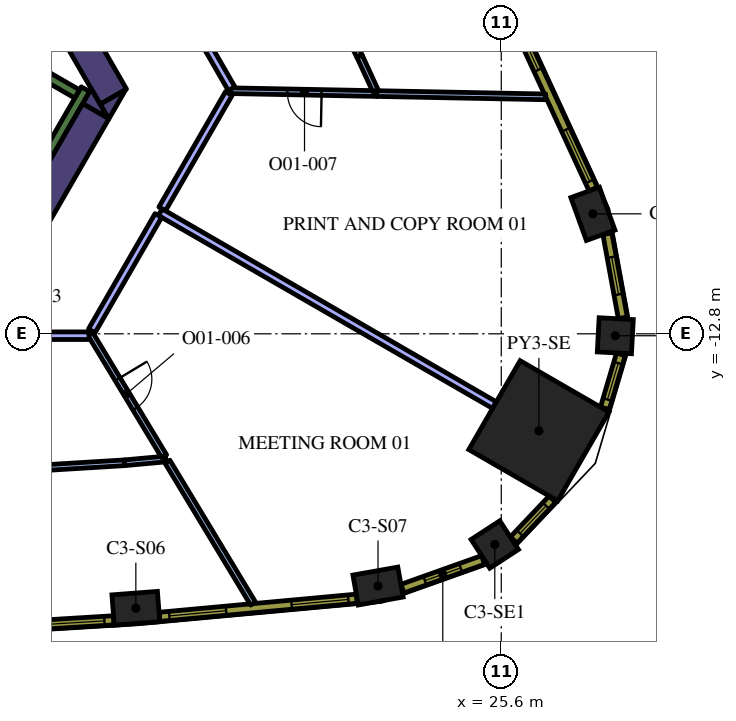
"""IFC4 building model, lengths in metres.
Left out: names, types, materials, properties, quantities, classifications, styles, units other than length and angle.
Written with IfcOpenShell. Run it as: python <this file> out.ifc"""

import sys

from ifc_helpers import new_model, si_unit, direction, frame, frame_2d, origin, origin_2d, place, context, subcontext, project, spatial, polyline, rectangle, outline, extrude, element, fill, save


model = new_model("IFC4")
c1 = context("Model", 3, precision=1e-05, world=origin(), true_north=direction((0.0, 1.0)))
c2 = subcontext(c1, "Body", "Model", "MODEL_VIEW")
j1 = project(units=[si_unit("LENGTHUNIT", "METRE"), si_unit("PLANEANGLEUNIT", "RADIAN")], contexts=[c1])
p1 = place(None, origin())
s1 = spatial("IfcSite", under=j1, at=p1, CompositionType="ELEMENT")
p2 = place(p1, origin())
s2 = spatial("IfcBuilding", under=s1, at=p2, CompositionType="ELEMENT")
p3 = place(p2, frame((0.0, 0.0, 145.8)))
s3 = spatial("IfcBuildingStorey", under=s2, at=p3, CompositionType="ELEMENT", Elevation=145.8)
p4 = place(p3, frame((26.591, -15.352, 0.0), z_axis=(0.0, 0.0, 1.0), x_axis=(0.866025403784, -0.5, 0.0)))
e1 = element("IfcColumn", 1, at=p4, inside=s3, PredefinedType="COLUMN", context=c2, shape_type="SweptSolid", body=[
    extrude(rectangle(XDim=2.7, YDim=2.7, at=origin_2d()), origin(), (0.0, 0.0, 1.0), 4.2),
])
for number, where, z_axis, x_axis in (
    (2, (15.985, -20.022, 0.0), (0.0, 0.0, 1.0), (0.997, 0.076, 0.0)),
    (3, (22.357, -19.437, 0.0), (0.0, 0.0, 1.0), (0.985, 0.175, 0.0)),
):
    element("IfcColumn", number, at=place(p3, frame(where, z_axis=z_axis, x_axis=x_axis)), inside=s3, PredefinedType="COLUMN", context=c2, shape_type="SweptSolid", body=[
        extrude(rectangle(XDim=1.2, YDim=0.8, at=origin_2d()), origin(), (0.0, 0.0, 1.0), 4.2),
    ])
for number, where, z_axis, x_axis in (
    (4, (25.43, -18.344, 0.0), (0.0, 0.0, 1.0), (0.838, 0.546, 0.0)),
    (5, (28.601, -12.851, 0.0), (0.0, 0.0, 1.0), (0.053, 0.999, 0.0)),
):
    element("IfcColumn", number, at=place(p3, frame(where, z_axis=z_axis, x_axis=x_axis)), inside=s3, PredefinedType="COLUMN", context=c2, shape_type="SweptSolid", body=[
        extrude(rectangle(XDim=0.9, YDim=0.9, at=origin_2d()), origin(), (0.0, 0.0, 1.0), 4.2),
    ])
p5 = place(p3, frame((28.012, -9.644, 0.0), z_axis=(0.0, 0.0, 1.0), x_axis=(-0.340743851601, 0.940156171918, 0.0)))
e6 = element("IfcColumn", 6, at=p5, inside=s3, PredefinedType="COLUMN", context=c2, shape_type="SweptSolid", body=[
    extrude(rectangle(XDim=1.2, YDim=0.8, at=origin_2d()), origin(), (0.0, 0.0, 1.0), 4.2),
])
p6 = place(p3, frame((9.129, 4.289, 0.0), z_axis=(0.0, 0.0, 1.0), x_axis=(0.499995742806, -0.866027861663, 0.0)))
e7 = element("IfcWall", 7, at=p6, inside=s3, PredefinedType="SOLIDWALL", context=c2, shape_type="SweptSolid", body=[
    extrude(rectangle(XDim=12.527, YDim=0.8, at=frame_2d((6.264, 0.0))), origin(), (0.0, 0.0, 1.0), 4.2),
])
p7 = place(p3, origin())
e8 = element("IfcWall", 8, at=p7, inside=s3, PredefinedType="SOLIDWALL", context=c2, shape_type="SweptSolid", body=[
    extrude(outline(polyline([(15.271, -7.15), (15.047, -6.762), (15.719, -6.374), (15.271, -7.15)])), origin(), (0.0, 0.0, 1.0), 4.2),
])
p8 = place(p3, frame((13.018, -10.252, 0.0), z_axis=(0.0, 0.0, 1.0), x_axis=(0.499984020225, 0.866034629516, 0.0)))
e9 = element("IfcWall", 9, at=p8, inside=s3, PredefinedType="SOLIDWALL", context=c2, shape_type="SweptSolid", body=[
    extrude(rectangle(XDim=3.824, YDim=0.8, at=frame_2d((1.912, 0.0))), origin(), (0.0, 0.0, 1.0), 4.2),
])
e10 = element("IfcWall", 10, at=p7, inside=s3, PredefinedType="SOLIDWALL", context=c2, shape_type="SweptSolid", body=[
    extrude(outline(polyline([(14.809, -6.35), (15.257, -7.126), (14.585, -6.738), (14.809, -6.35)])), origin(), (0.0, 0.0, 1.0), 4.2),
])
p9 = place(p3, frame((12.84, -9.511, 0.0), z_axis=(0.0, 0.0, 1.0), x_axis=(0.499997733992, 0.866026712061, 0.0)))
e11 = element("IfcWall", 11, at=p9, inside=s3, PredefinedType="SOLIDWALL", context=c2, shape_type="SweptSolid", body=[
    extrude(rectangle(XDim=3.634, YDim=0.25, at=frame_2d((1.817, 0.0))), origin(), (0.0, 0.0, 1.0), 4.2),
])
p10 = place(p3, frame((8.334, -2.964, 0.0), z_axis=(0.0, 0.0, 1.0), x_axis=(0.866016039709, -0.500016218704, 0.0)))
e12 = element("IfcWall", 12, at=p10, inside=s3, PredefinedType="SOLIDWALL", context=c2, shape_type="SweptSolid", body=[
    extrude(rectangle(XDim=7.05, YDim=0.25, at=frame_2d((3.525, 0.0))), origin(), (0.0, 0.0, 1.0), 4.2),
])
p11 = place(p3, frame((15.692, -16.193, 0.0), z_axis=(0.0, 0.0, 1.0), x_axis=(-0.998137075468, -0.061011298754, 0.0)))
e13 = element("IfcWall", 13, at=p11, inside=s3, PredefinedType="PARTITIONING", context=c2, shape_type="SweptSolid", body=[
    extrude(rectangle(XDim=6.282, YDim=0.15, at=frame_2d((3.141, 0.0))), origin(), (0.0, 0.0, 1.0), 3.15),
])
p12 = place(p11, frame((2.683, 0.0, 0.0)))
e14 = element("IfcOpeningElement", 14, at=p12, cuts=e13, PredefinedType="OPENING", context=c2, shape_type="SweptSolid", body=[
    extrude(rectangle(XDim=0.9, YDim=2.1, at=frame_2d((0.45, 1.05))), frame((0.0, 0.085, 0.0), z_axis=(0.0, -1.0, 0.0), x_axis=(1.0, 0.0, 0.0)), (0.0, 0.0, 1.0), 0.17),
])
p13 = place(p3, frame((15.692, -16.193, 0.0), z_axis=(0.0, 0.0, 1.0), x_axis=(0.995822859979, 0.091306251389, 0.0)))
e15 = element("IfcWall", 15, at=p13, inside=s3, PredefinedType="PARTITIONING", context=c2, shape_type="SweptSolid", body=[
    extrude(rectangle(XDim=1.086, YDim=0.15, at=frame_2d((0.543, 0.0))), origin(), (0.0, 0.0, 1.0), 3.15),
])
p14 = place(p3, frame((16.816, -16.165, 0.0), z_axis=(0.0, 0.0, 1.0), x_axis=(0.516814925326, -0.85609715159, 0.0)))
e16 = element("IfcWall", 16, at=p14, inside=s3, PredefinedType="PARTITIONING", context=c2, shape_type="SweptSolid", body=[
    extrude(rectangle(XDim=4.362, YDim=0.15, at=frame_2d((2.181, 0.0))), origin(), (0.0, 0.0, 1.0), 3.15),
])
p15 = place(p3, frame((14.782, -12.796, 0.0), z_axis=(0.0, 0.0, 1.0), x_axis=(0.516809076879, -0.856100682196, 0.0)))
e17 = element("IfcWall", 17, at=p15, inside=s3, PredefinedType="PARTITIONING", context=c2, shape_type="SweptSolid", body=[
    extrude(rectangle(XDim=3.768, YDim=0.15, at=frame_2d((1.884, 0.0))), origin(), (0.0, 0.0, 1.0), 3.15),
])
p16 = place(p15, frame((1.4, 0.0, 0.0)))
e18 = element("IfcOpeningElement", 18, at=p16, cuts=e17, PredefinedType="OPENING", context=c2, shape_type="SweptSolid", body=[
    extrude(rectangle(XDim=0.9, YDim=2.1, at=frame_2d((0.45, 1.05))), frame((0.0, 0.085, 0.0), z_axis=(0.0, -1.0, 0.0), x_axis=(1.0, 0.0, 0.0)), (0.0, 0.0, 1.0), 0.17),
])
p17 = place(p3, frame((5.03, -12.85, 0.0), z_axis=(0.0, 0.0, 1.0), x_axis=(1.0, 0.0, 0.0)))
e19 = element("IfcWall", 19, at=p17, inside=s3, PredefinedType="PARTITIONING", context=c2, shape_type="SweptSolid", body=[
    extrude(rectangle(XDim=9.721, YDim=0.2, at=frame_2d((4.861, 0.0))), origin(), (0.0, 0.0, 1.0), 3.15),
])
p18 = place(p3, frame((16.628, -9.6, 0.0), z_axis=(0.0, 0.0, 1.0), x_axis=(0.866031435434, -0.499989552732, 0.0)))
e20 = element("IfcWall", 20, at=p18, inside=s3, PredefinedType="PARTITIONING", context=c2, shape_type="SweptSolid", body=[
    extrude(rectangle(XDim=10.154, YDim=0.2, at=frame_2d((5.077, 0.0))), origin(), (0.0, 0.0, 1.0), 3.15),
])
p19 = place(p3, frame((14.825, -12.722, 0.0), z_axis=(0.0, 0.0, 1.0), x_axis=(0.499981686864, 0.86603597662, 0.0)))
e21 = element("IfcWall", 21, at=p19, inside=s3, PredefinedType="PARTITIONING", context=c2, shape_type="SweptSolid", body=[
    extrude(rectangle(XDim=3.506, YDim=0.2, at=frame_2d((1.753, 0.0))), origin(), (0.0, 0.0, 1.0), 3.15),
])
p20 = place(p3, frame((22.32, -6.479, 0.0), z_axis=(0.0, 0.0, 1.0), x_axis=(0.999809252738, -0.019530953357, 0.0)))
e22 = element("IfcWall", 22, at=p20, inside=s3, PredefinedType="PARTITIONING", context=c2, shape_type="SweptSolid", body=[
    extrude(rectangle(XDim=4.45, YDim=0.15, at=frame_2d((2.225, 0.0))), origin(), (0.0, 0.0, 1.0), 3.15),
])
p21 = place(p3, frame((22.328, -6.479, 0.0), z_axis=(0.0, 0.0, 1.0), x_axis=(-0.999809811932, 0.019502306655, 0.0)))
e23 = element("IfcWall", 23, at=p21, inside=s3, PredefinedType="PARTITIONING", context=c2, shape_type="SweptSolid", body=[
    extrude(rectangle(XDim=3.856, YDim=0.15, at=frame_2d((1.928, 0.0))), origin(), (0.0, 0.0, 1.0), 3.15),
])
p22 = place(p21, frame((1.456, 0.0, 0.0)))
e24 = element("IfcOpeningElement", 24, at=p22, cuts=e23, PredefinedType="OPENING", context=c2, shape_type="SweptSolid", body=[
    extrude(rectangle(XDim=0.9, YDim=2.1, at=frame_2d((0.45, 1.05))), frame((0.0, 0.085, 0.0), z_axis=(0.0, -1.0, 0.0), x_axis=(1.0, 0.0, 0.0)), (0.0, 0.0, 1.0), 0.17),
])
p23 = place(p3, frame((16.678, -9.513, 0.0), z_axis=(0.0, 0.0, 1.0), x_axis=(0.500011844827, 0.866018565062, 0.0)))
e25 = element("IfcWall", 25, at=p23, inside=s3, PredefinedType="PARTITIONING", context=c2, shape_type="SweptSolid", body=[
    extrude(rectangle(XDim=3.505, YDim=0.2, at=frame_2d((1.753, 0.0))), origin(), (0.0, 0.0, 1.0), 3.15),
])
p24 = place(p3, frame((22.289, -6.403, 0.0), z_axis=(0.0, 0.0, 1.0), x_axis=(-0.41893460807, 0.908016406328, 0.0)))
e26 = element("IfcWall", 26, at=p24, inside=s3, PredefinedType="PARTITIONING", context=c2, shape_type="SweptSolid", body=[
    extrude(rectangle(XDim=1.002, YDim=0.15, at=frame_2d((0.501, 0.0))), origin(), (0.0, 0.0, 1.0), 3.15),
])
p25 = place(p3, frame((19.066, 0.129, 0.0), z_axis=(0.0, 0.0, 1.0), x_axis=(0.446202922071, -0.89493181435, 0.0)))
e27 = element("IfcWall", 27, at=p25, inside=s3, PredefinedType="PARTITIONING", context=c2, shape_type="SweptSolid", body=[
    extrude(rectangle(XDim=6.282, YDim=0.15, at=frame_2d((3.141, 0.0))), origin(), (0.0, 0.0, 1.0), 3.15),
])
p26 = place(p25, frame((2.683, 0.0, 0.0)))
e28 = element("IfcOpeningElement", 28, at=p26, cuts=e27, PredefinedType="OPENING", context=c2, shape_type="SweptSolid", body=[
    extrude(rectangle(XDim=0.9, YDim=2.1, at=frame_2d((0.45, 1.05))), frame((0.0, 0.085, 0.0), z_axis=(0.0, -1.0, 0.0), x_axis=(1.0, 0.0, 0.0)), (0.0, 0.0, 1.0), 0.17),
])
p27 = place(p3, frame((18.504, -6.35, 0.0), z_axis=(0.0, 0.0, 1.0), x_axis=(-0.499995029582, 0.866028273438, 0.0)))
e29 = element("IfcWall", 29, at=p27, inside=s3, PredefinedType="PARTITIONING", context=c2, shape_type="SweptSolid", body=[
    extrude(rectangle(XDim=9.717, YDim=0.2, at=frame_2d((4.859, 0.0))), origin(), (0.0, 0.0, 1.0), 3.15),
])
p28 = place(p3, frame((10.211, -20.656, 0.0), z_axis=(0.0, 0.0, 1.0), x_axis=(0.998135294646, 0.061040425794, 0.0)))
e30 = element("IfcWall", 30, at=p28, inside=s3, PredefinedType="SOLIDWALL", context=c2, shape_type="SweptSolid", body=[
    extrude(rectangle(XDim=5.204, YDim=0.24, at=frame_2d((2.602, 0.0))), origin(), (0.0, 0.0, 1.0), 3.95),
])
p29 = place(p28, frame((0.248, 0.0, 0.9)))
e31 = element("IfcOpeningElement", 31, at=p29, cuts=e30, PredefinedType="OPENING", context=c2, shape_type="SweptSolid", body=[
    extrude(rectangle(XDim=1.5, YDim=2.55, at=frame_2d((0.75, 1.275))), frame((0.0, 0.13, 0.0), z_axis=(0.0, -1.0, 0.0), x_axis=(1.0, 0.0, 0.0)), (0.0, 0.0, 1.0), 0.26),
])
p30 = place(p28, frame((3.455, 0.0, 0.9)))
e32 = element("IfcOpeningElement", 32, at=p30, cuts=e30, PredefinedType="OPENING", context=c2, shape_type="SweptSolid", body=[
    extrude(rectangle(XDim=1.5, YDim=2.55, at=frame_2d((0.75, 1.275))), frame((0.0, 0.13, 0.0), z_axis=(0.0, -1.0, 0.0), x_axis=(1.0, 0.0, 0.0)), (0.0, 0.0, 1.0), 0.26),
])
p31 = place(p3, frame((16.606, -20.247, 0.0), z_axis=(0.0, 0.0, 1.0), x_axis=(0.995808712151, 0.091460422067, 0.0)))
e33 = element("IfcWall", 33, at=p31, inside=s3, PredefinedType="SOLIDWALL", context=c2, shape_type="SweptSolid", body=[
    extrude(rectangle(XDim=5.213, YDim=0.24, at=frame_2d((2.606, 0.0))), origin(), (0.0, 0.0, 1.0), 3.95),
])
p32 = place(p31, frame((0.261, 0.0, 0.9)))
e34 = element("IfcOpeningElement", 34, at=p32, cuts=e33, PredefinedType="OPENING", context=c2, shape_type="SweptSolid", body=[
    extrude(rectangle(XDim=1.5, YDim=2.55, at=frame_2d((0.75, 1.275))), frame((0.0, 0.13, 0.0), z_axis=(0.0, -1.0, 0.0), x_axis=(1.0, 0.0, 0.0)), (0.0, 0.0, 1.0), 0.26),
])
p33 = place(p31, frame((3.492, 0.0, 0.9)))
e35 = element("IfcOpeningElement", 35, at=p33, cuts=e33, PredefinedType="OPENING", context=c2, shape_type="SweptSolid", body=[
    extrude(rectangle(XDim=1.5, YDim=2.55, at=frame_2d((0.75, 1.275))), frame((0.0, 0.13, 0.0), z_axis=(0.0, -1.0, 0.0), x_axis=(1.0, 0.0, 0.0)), (0.0, 0.0, 1.0), 0.26),
])
p34 = place(p3, frame((23.001, -19.505, 0.0), z_axis=(0.0, 0.0, 1.0), x_axis=(0.942099727267, 0.335332825539, 0.0)))
e36 = element("IfcWall", 36, at=p34, inside=s3, PredefinedType="SOLIDWALL", context=c2, shape_type="SweptSolid", body=[
    extrude(rectangle(XDim=2.25, YDim=0.24, at=frame_2d((1.125, 0.0))), origin(), (0.0, 0.0, 1.0), 3.95),
])
p35 = place(p34, frame((0.625, 0.0, 0.9)))
e37 = element("IfcOpeningElement", 37, at=p35, cuts=e36, PredefinedType="OPENING", context=c2, shape_type="SweptSolid", body=[
    extrude(rectangle(XDim=1.0, YDim=2.55, at=frame_2d((0.5, 1.275))), frame((0.0, 0.13, 0.0), z_axis=(0.0, -1.0, 0.0), x_axis=(1.0, 0.0, 0.0)), (0.0, 0.0, 1.0), 0.26),
])
p36 = place(p3, frame((25.927, -18.226, 0.0), z_axis=(0.0, 0.0, 1.0), x_axis=(0.687986858937, 0.725723144133, 0.0)))
e38 = element("IfcWall", 38, at=p36, inside=s3, PredefinedType="SOLIDWALL", context=c2, shape_type="SweptSolid", body=[
    extrude(rectangle(XDim=1.481, YDim=0.24, at=frame_2d((0.741, 0.0))), origin(), (0.0, 0.0, 1.0), 3.95),
])
p37 = place(p36, frame((0.241, 0.0, 0.9)))
e39 = element("IfcOpeningElement", 39, at=p37, cuts=e38, PredefinedType="OPENING", context=c2, shape_type="SweptSolid", body=[
    extrude(rectangle(XDim=1.0, YDim=2.55, at=frame_2d((0.5, 1.275))), frame((0.0, 0.13, 0.0), z_axis=(0.0, -1.0, 0.0), x_axis=(1.0, 0.0, 0.0)), (0.0, 0.0, 1.0), 0.26),
])
p38 = place(p3, frame((28.326, -14.76, 0.0), z_axis=(0.0, 0.0, 1.0), x_axis=(0.284413721403, 0.958701640281, 0.0)))
e40 = element("IfcWall", 40, at=p38, inside=s3, PredefinedType="SOLIDWALL", context=c2, shape_type="SweptSolid", body=[
    extrude(rectangle(XDim=1.482, YDim=0.24, at=frame_2d((0.741, 0.0))), origin(), (0.0, 0.0, 1.0), 3.95),
])
p39 = place(p38, frame((0.241, 0.0, 0.9)))
e41 = element("IfcOpeningElement", 41, at=p39, cuts=e40, PredefinedType="OPENING", context=c2, shape_type="SweptSolid", body=[
    extrude(rectangle(XDim=1.0, YDim=2.55, at=frame_2d((0.5, 1.275))), frame((0.0, 0.13, 0.0), z_axis=(0.0, -1.0, 0.0), x_axis=(1.0, 0.0, 0.0)), (0.0, 0.0, 1.0), 0.26),
])
p40 = place(p3, frame((28.799, -12.38, 0.0), z_axis=(0.0, 0.0, 1.0), x_axis=(-0.180737189259, 0.983531427265, 0.0)))
e42 = element("IfcWall", 42, at=p40, inside=s3, PredefinedType="SOLIDWALL", context=c2, shape_type="SweptSolid", body=[
    extrude(rectangle(XDim=2.25, YDim=0.24, at=frame_2d((1.125, 0.0))), origin(), (0.0, 0.0, 1.0), 3.95),
])
p41 = place(p40, frame((0.625, 0.0, 0.9)))
e43 = element("IfcOpeningElement", 43, at=p41, cuts=e42, PredefinedType="OPENING", context=c2, shape_type="SweptSolid", body=[
    extrude(rectangle(XDim=1.0, YDim=2.55, at=frame_2d((0.5, 1.275))), frame((0.0, 0.13, 0.0), z_axis=(0.0, -1.0, 0.0), x_axis=(1.0, 0.0, 0.0)), (0.0, 0.0, 1.0), 0.26),
])
p42 = place(p3, frame((28.02, -8.992, 0.0), z_axis=(0.0, 0.0, 1.0), x_axis=(-0.418722559465, 0.908114209885, 0.0)))
e44 = element("IfcWall", 44, at=p42, inside=s3, PredefinedType="SOLIDWALL", context=c2, shape_type="SweptSolid", body=[
    extrude(rectangle(XDim=5.213, YDim=0.24, at=frame_2d((2.606, 0.0))), origin(), (0.0, 0.0, 1.0), 3.95),
])
p43 = place(p42, frame((0.221, 0.0, 0.9)))
e45 = element("IfcOpeningElement", 45, at=p43, cuts=e44, PredefinedType="OPENING", context=c2, shape_type="SweptSolid", body=[
    extrude(rectangle(XDim=1.5, YDim=2.55, at=frame_2d((0.75, 1.275))), frame((0.0, 0.13, 0.0), z_axis=(0.0, -1.0, 0.0), x_axis=(1.0, 0.0, 0.0)), (0.0, 0.0, 1.0), 0.26),
])
p44 = place(p42, frame((3.452, 0.0, 0.9)))
e46 = element("IfcOpeningElement", 46, at=p44, cuts=e44, PredefinedType="OPENING", context=c2, shape_type="SweptSolid", body=[
    extrude(rectangle(XDim=1.5, YDim=2.55, at=frame_2d((0.75, 1.275))), frame((0.0, 0.13, 0.0), z_axis=(0.0, -1.0, 0.0), x_axis=(1.0, 0.0, 0.0)), (0.0, 0.0, 1.0), 0.26),
])
p45 = place(p16, origin())
e47 = element("IfcDoor", 47, at=p45, inside=s3, OperationType="SINGLE_SWING_LEFT", PredefinedType="DOOR", context=c2, shape_type="SweptSolid", body=[
    extrude(rectangle(XDim=0.9, YDim=2.1, at=frame_2d((0.45, 1.05))), frame((0.0, 0.025, 0.0), z_axis=(0.0, -1.0, 0.0), x_axis=(1.0, 0.0, 0.0)), (0.0, 0.0, 1.0), 0.05),
])
fill(e18, e47)
p46 = place(p22, origin())
e48 = element("IfcDoor", 48, at=p46, inside=s3, OperationType="SINGLE_SWING_LEFT", PredefinedType="DOOR", context=c2, shape_type="SweptSolid", body=[
    extrude(rectangle(XDim=0.9, YDim=2.1, at=frame_2d((0.45, 1.05))), frame((0.0, 0.025, 0.0), z_axis=(0.0, -1.0, 0.0), x_axis=(1.0, 0.0, 0.0)), (0.0, 0.0, 1.0), 0.05),
])
fill(e24, e48)
p47 = place(p30, origin())
e49 = element("IfcWindow", 49, at=p47, inside=s3, PartitioningType="SINGLE_PANEL", PredefinedType="WINDOW", context=c2, shape_type="SweptSolid", body=[
    extrude(rectangle(XDim=1.5, YDim=2.55, at=frame_2d((0.75, 1.275))), frame((0.0, 0.04, 0.0), z_axis=(0.0, -1.0, 0.0), x_axis=(1.0, 0.0, 0.0)), (0.0, 0.0, 1.0), 0.06),
])
fill(e32, e49)
p48 = place(p32, origin())
e50 = element("IfcWindow", 50, at=p48, inside=s3, PartitioningType="SINGLE_PANEL", PredefinedType="WINDOW", context=c2, shape_type="SweptSolid", body=[
    extrude(rectangle(XDim=1.5, YDim=2.55, at=frame_2d((0.75, 1.275))), frame((0.0, 0.04, 0.0), z_axis=(0.0, -1.0, 0.0), x_axis=(1.0, 0.0, 0.0)), (0.0, 0.0, 1.0), 0.06),
])
fill(e34, e50)
p49 = place(p33, origin())
e51 = element("IfcWindow", 51, at=p49, inside=s3, PartitioningType="SINGLE_PANEL", PredefinedType="WINDOW", context=c2, shape_type="SweptSolid", body=[
    extrude(rectangle(XDim=1.5, YDim=2.55, at=frame_2d((0.75, 1.275))), frame((0.0, 0.04, 0.0), z_axis=(0.0, -1.0, 0.0), x_axis=(1.0, 0.0, 0.0)), (0.0, 0.0, 1.0), 0.06),
])
fill(e35, e51)
p50 = place(p35, origin())
e52 = element("IfcWindow", 52, at=p50, inside=s3, PartitioningType="SINGLE_PANEL", PredefinedType="WINDOW", context=c2, shape_type="SweptSolid", body=[
    extrude(rectangle(XDim=1.0, YDim=2.55, at=frame_2d((0.5, 1.275))), frame((0.0, 0.04, 0.0), z_axis=(0.0, -1.0, 0.0), x_axis=(1.0, 0.0, 0.0)), (0.0, 0.0, 1.0), 0.06),
])
fill(e37, e52)
p51 = place(p37, origin())
e53 = element("IfcWindow", 53, at=p51, inside=s3, PartitioningType="SINGLE_PANEL", PredefinedType="WINDOW", context=c2, shape_type="SweptSolid", body=[
    extrude(rectangle(XDim=1.0, YDim=2.55, at=frame_2d((0.5, 1.275))), frame((0.0, 0.04, 0.0), z_axis=(0.0, -1.0, 0.0), x_axis=(1.0, 0.0, 0.0)), (0.0, 0.0, 1.0), 0.06),
])
fill(e39, e53)
p52 = place(p39, origin())
e54 = element("IfcWindow", 54, at=p52, inside=s3, PartitioningType="SINGLE_PANEL", PredefinedType="WINDOW", context=c2, shape_type="SweptSolid", body=[
    extrude(rectangle(XDim=1.0, YDim=2.55, at=frame_2d((0.5, 1.275))), frame((0.0, 0.04, 0.0), z_axis=(0.0, -1.0, 0.0), x_axis=(1.0, 0.0, 0.0)), (0.0, 0.0, 1.0), 0.06),
])
fill(e41, e54)
p53 = place(p41, origin())
e55 = element("IfcWindow", 55, at=p53, inside=s3, PartitioningType="SINGLE_PANEL", PredefinedType="WINDOW", context=c2, shape_type="SweptSolid", body=[
    extrude(rectangle(XDim=1.0, YDim=2.55, at=frame_2d((0.5, 1.275))), frame((0.0, 0.04, 0.0), z_axis=(0.0, -1.0, 0.0), x_axis=(1.0, 0.0, 0.0)), (0.0, 0.0, 1.0), 0.06),
])
fill(e43, e55)
p54 = place(p43, origin())
e56 = element("IfcWindow", 56, at=p54, inside=s3, PartitioningType="SINGLE_PANEL", PredefinedType="WINDOW", context=c2, shape_type="SweptSolid", body=[
    extrude(rectangle(XDim=1.5, YDim=2.55, at=frame_2d((0.75, 1.275))), frame((0.0, 0.04, 0.0), z_axis=(0.0, -1.0, 0.0), x_axis=(1.0, 0.0, 0.0)), (0.0, 0.0, 1.0), 0.06),
])
fill(e45, e56)
p55 = place(p44, origin())
e57 = element("IfcWindow", 57, at=p55, inside=s3, PartitioningType="SINGLE_PANEL", PredefinedType="WINDOW", context=c2, shape_type="SweptSolid", body=[
    extrude(rectangle(XDim=1.5, YDim=2.55, at=frame_2d((0.75, 1.275))), frame((0.0, 0.04, 0.0), z_axis=(0.0, -1.0, 0.0), x_axis=(1.0, 0.0, 0.0)), (0.0, 0.0, 1.0), 0.06),
])
fill(e46, e57)
save(model, sys.argv[1])
